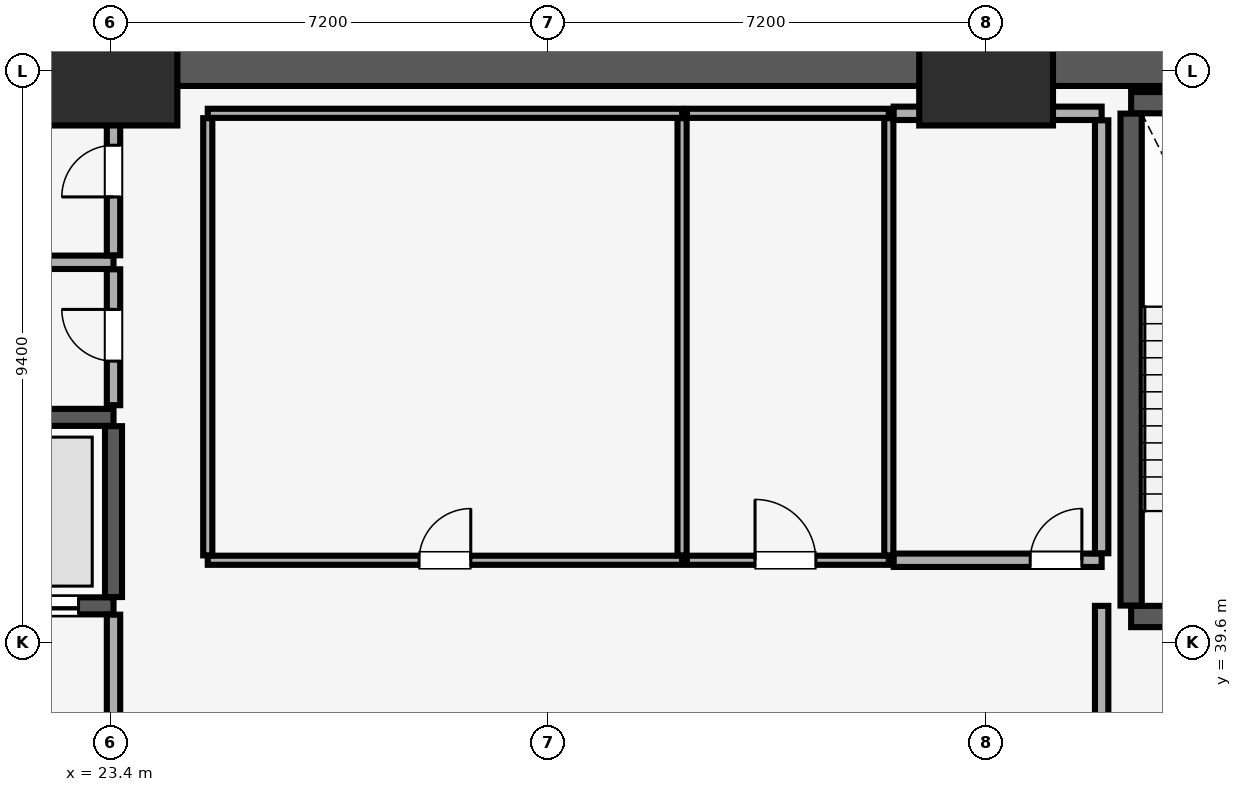
"""IFC4 building model, lengths in metres.
Left out: names, types, materials, properties, quantities, classifications, styles, units other than length and angle.
Written with IfcOpenShell. Run it as: python <this file> out.ifc"""

import sys

from ifc_helpers import new_model, si_unit, direction, frame, frame_2d, origin, origin_2d, place, context, subcontext, project, spatial, rectangle, extrude, element, fill, save


model = new_model("IFC4")
c1 = context("Model", 3, precision=1e-05, world=origin(), true_north=direction((0.0, 1.0)))
c2 = subcontext(c1, "Body", "Model", "MODEL_VIEW")
j1 = project(units=[si_unit("LENGTHUNIT", "METRE"), si_unit("PLANEANGLEUNIT", "RADIAN")], contexts=[c1])
p1 = place(None, origin())
s1 = spatial("IfcSite", under=j1, at=p1, CompositionType="ELEMENT")
p2 = place(p1, origin())
s2 = spatial("IfcBuilding", under=s1, at=p2, CompositionType="ELEMENT")
p3 = place(p2, frame((0.0, 0.0, -4.6)))
s3 = spatial("IfcBuildingStorey", under=s2, at=p3, CompositionType="ELEMENT", Elevation=-4.6)
for number, where, z_axis, x_axis in (
    (1, (23.4, 49.0, 0.0), (0.0, 0.0, 1.0), (1.0, 0.0, 0.0)),
    (2, (37.8, 49.0, 0.0), (0.0, 0.0, 1.0), (1.0, 0.0, 0.0)),
):
    element("IfcColumn", number, at=place(p3, frame(where, z_axis=z_axis, x_axis=x_axis)), inside=s3, PredefinedType="USERDEFINED", context=c2, shape_type="SweptSolid", body=[
        extrude(rectangle(XDim=2.2, YDim=1.8, at=origin_2d()), origin(), (0.0, 0.0, 1.0), 4.25),
    ])
p4 = place(p3, frame((16.2, 49.3, 0.0), z_axis=(0.0, 0.0, 1.0), x_axis=(1.0, 0.0, 0.0)))
e3 = element("IfcWall", 3, at=p4, inside=s3, PredefinedType="SHEAR", context=c2, shape_type="SweptSolid", body=[
    extrude(rectangle(XDim=51.6, YDim=1.1, at=frame_2d((25.8, 0.0))), origin(), (0.0, 0.0, 1.0), 4.25),
])
p5 = place(p3, frame((40.185, 40.025, 0.0), z_axis=(0.0, 0.0, 1.0), x_axis=(1.0, 0.0, 0.0)))
e4 = element("IfcWall", 4, at=p5, inside=s3, PredefinedType="SHEAR", context=c2, shape_type="SweptSolid", body=[
    extrude(rectangle(XDim=3.63, YDim=0.35, at=frame_2d((1.815, 0.0))), origin(), (0.0, 0.0, 1.0), 4.25),
])
p6 = place(p5, frame((1.24, 0.0, 0.0)))
e5 = element("IfcOpeningElement", 5, at=p6, cuts=e4, PredefinedType="OPENING", context=c2, shape_type="SweptSolid", body=[
    extrude(rectangle(XDim=1.15, YDim=2.15, at=frame_2d((0.575, 1.075))), frame((0.0, 0.185, 0.0), z_axis=(0.0, -1.0, 0.0), x_axis=(1.0, 0.0, 0.0)), (0.0, 0.0, 1.0), 0.37),
])
p7 = place(p3, frame((40.185, 48.475, 0.0), z_axis=(0.0, 0.0, 1.0), x_axis=(1.0, 0.0, 0.0)))
e6 = element("IfcWall", 6, at=p7, inside=s3, PredefinedType="SHEAR", context=c2, shape_type="SweptSolid", body=[
    extrude(rectangle(XDim=3.63, YDim=0.35, at=frame_2d((1.815, 0.0))), origin(), (0.0, 0.0, 1.0), 4.25),
])
p8 = place(p3, frame((40.185, 40.205, 0.0), z_axis=(0.0, 0.0, 1.0), x_axis=(0.0, 1.0, 0.0)))
e7 = element("IfcWall", 7, at=p8, inside=s3, PredefinedType="SHEAR", context=c2, shape_type="SweptSolid", body=[
    extrude(rectangle(XDim=8.09, YDim=0.35, at=frame_2d((4.045, 0.0))), origin(), (0.0, 0.0, 1.0), 4.25),
])
p9 = place(p3, frame((21.035, 40.2, 0.0), z_axis=(0.0, 0.0, 1.0), x_axis=(1.0, 0.0, 0.0)))
e8 = element("IfcWall", 8, at=p9, inside=s3, PredefinedType="SHEAR", context=c2, shape_type="SweptSolid", body=[
    extrude(rectangle(XDim=2.415, YDim=0.28, at=frame_2d((1.208, 0.0))), origin(), (0.0, 0.0, 1.0), 4.25),
])
p10 = place(p9, frame((0.54, 0.0, 0.0)))
e9 = element("IfcOpeningElement", 9, at=p10, cuts=e8, PredefinedType="OPENING", context=c2, shape_type="SweptSolid", body=[
    extrude(rectangle(XDim=1.3, YDim=2.3, at=frame_2d((0.65, 1.15))), frame((0.0, 0.15, 0.0), z_axis=(0.0, -1.0, 0.0), x_axis=(1.0, 0.0, 0.0)), (0.0, 0.0, 1.0), 0.3),
])
p11 = place(p3, frame((21.035, 43.3, 0.0), z_axis=(0.0, 0.0, 1.0), x_axis=(1.0, 0.0, 0.0)))
e10 = element("IfcWall", 10, at=p11, inside=s3, PredefinedType="SHEAR", context=c2, shape_type="SweptSolid", body=[
    extrude(rectangle(XDim=2.415, YDim=0.28, at=frame_2d((1.208, 0.0))), origin(), (0.0, 0.0, 1.0), 4.25),
])
p12 = place(p3, frame((23.45, 40.345, 0.0), z_axis=(0.0, 0.0, 1.0), x_axis=(0.0, 1.0, 0.0)))
e11 = element("IfcWall", 11, at=p12, inside=s3, PredefinedType="SHEAR", context=c2, shape_type="SweptSolid", body=[
    extrude(rectangle(XDim=2.81, YDim=0.28, at=frame_2d((1.405, 0.0))), origin(), (0.0, 0.0, 1.0), 4.25),
])
p13 = place(p3, frame((23.45, 34.415, 0.0), z_axis=(0.0, 0.0, 1.0), x_axis=(0.0, 1.0, 0.0)))
e12 = element("IfcWall", 12, at=p13, inside=s3, PredefinedType="PARTITIONING", context=c2, shape_type="SweptSolid", body=[
    extrude(rectangle(XDim=5.64, YDim=0.22, at=frame_2d((2.82, 0.0))), origin(), (0.0, 0.0, 1.0), 4.25),
])
p14 = place(p3, frame((39.7, 34.415, 0.0), z_axis=(0.0, 0.0, 1.0), x_axis=(0.0, 1.0, 0.0)))
e13 = element("IfcWall", 13, at=p14, inside=s3, PredefinedType="PARTITIONING", context=c2, shape_type="SweptSolid", body=[
    extrude(rectangle(XDim=5.785, YDim=0.22, at=frame_2d((2.893, 0.0))), origin(), (0.0, 0.0, 1.0), 4.25),
])
p15 = place(p3, frame((21.035, 45.85, 0.0), z_axis=(0.0, 0.0, 1.0), x_axis=(1.0, 0.0, 0.0)))
e14 = element("IfcWall", 14, at=p15, inside=s3, PredefinedType="PARTITIONING", context=c2, shape_type="SweptSolid", body=[
    extrude(rectangle(XDim=2.415, YDim=0.22, at=frame_2d((1.208, 0.0))), origin(), (0.0, 0.0, 1.0), 4.25),
])
p16 = place(p3, frame((23.45, 43.5, 0.0), z_axis=(0.0, 0.0, 1.0), x_axis=(0.0, 1.0, 0.0)))
e15 = element("IfcWall", 15, at=p16, inside=s3, PredefinedType="PARTITIONING", context=c2, shape_type="SweptSolid", body=[
    extrude(rectangle(XDim=2.235, YDim=0.22, at=frame_2d((1.118, 0.0))), origin(), (0.0, 0.0, 1.0), 4.25),
])
p17 = place(p16, frame((0.725, 0.0, 0.0)))
e16 = element("IfcOpeningElement", 16, at=p17, cuts=e15, PredefinedType="OPENING", context=c2, shape_type="SweptSolid", body=[
    extrude(rectangle(XDim=0.85, YDim=2.1, at=frame_2d((0.425, 1.05))), frame((0.0, 0.12, 0.0), z_axis=(0.0, -1.0, 0.0), x_axis=(1.0, 0.0, 0.0)), (0.0, 0.0, 1.0), 0.24),
])
p18 = place(p3, frame((21.035, 48.3, 0.0), z_axis=(0.0, 0.0, 1.0), x_axis=(1.0, 0.0, 0.0)))
e17 = element("IfcWall", 17, at=p18, inside=s3, PredefinedType="PARTITIONING", context=c2, shape_type="SweptSolid", body=[
    extrude(rectangle(XDim=2.415, YDim=0.22, at=frame_2d((1.208, 0.0))), origin(), (0.0, 0.0, 1.0), 4.25),
])
p19 = place(p3, frame((23.45, 45.965, 0.0), z_axis=(0.0, 0.0, 1.0), x_axis=(0.0, 1.0, 0.0)))
e18 = element("IfcWall", 18, at=p19, inside=s3, PredefinedType="PARTITIONING", context=c2, shape_type="SweptSolid", body=[
    extrude(rectangle(XDim=2.22, YDim=0.22, at=frame_2d((1.11, 0.0))), origin(), (0.0, 0.0, 1.0), 4.25),
])
p20 = place(p19, frame((0.96, 0.0, 0.0)))
e19 = element("IfcOpeningElement", 19, at=p20, cuts=e18, PredefinedType="OPENING", context=c2, shape_type="SweptSolid", body=[
    extrude(rectangle(XDim=0.85, YDim=2.1, at=frame_2d((0.425, 1.05))), frame((0.0, 0.12, 0.0), z_axis=(0.0, -1.0, 0.0), x_axis=(1.0, 0.0, 0.0)), (0.0, 0.0, 1.0), 0.24),
])
p21 = place(p3, frame((25.0, 40.95, 0.0), z_axis=(0.0, 0.0, 1.0), x_axis=(1.0, 0.0, 0.0)))
e20 = element("IfcWall", 20, at=p21, inside=s3, PredefinedType="PARTITIONING", context=c2, shape_type="SweptSolid", body=[
    extrude(rectangle(XDim=7.8, YDim=0.15, at=frame_2d((3.9, 0.0))), origin(), (0.0, 0.0, 1.0), 4.25),
])
p22 = place(p21, frame((3.475, 0.0, 0.0)))
e21 = element("IfcOpeningElement", 21, at=p22, cuts=e20, PredefinedType="OPENING", context=c2, shape_type="SweptSolid", body=[
    extrude(rectangle(XDim=0.85, YDim=2.1, at=frame_2d((0.425, 1.05))), frame((0.0, 0.085, 0.0), z_axis=(0.0, -1.0, 0.0), x_axis=(1.0, 0.0, 0.0)), (0.0, 0.0, 1.0), 0.17),
])
p23 = place(p3, frame((25.0, 48.3, 0.0), z_axis=(0.0, 0.0, 1.0), x_axis=(1.0, 0.0, 0.0)))
e22 = element("IfcWall", 22, at=p23, inside=s3, PredefinedType="PARTITIONING", context=c2, shape_type="SweptSolid", body=[
    extrude(rectangle(XDim=7.8, YDim=0.15, at=frame_2d((3.9, 0.0))), origin(), (0.0, 0.0, 1.0), 4.25),
])
for number, where, z_axis, x_axis in (
    (23, (25.0, 41.03, 0.0), (0.0, 0.0, 1.0), (0.0, 1.0, 0.0)),
    (24, (32.8, 41.03, 0.0), (0.0, 0.0, 1.0), (0.0, 1.0, 0.0)),
):
    element("IfcWall", number, at=place(p3, frame(where, z_axis=z_axis, x_axis=x_axis)), inside=s3, PredefinedType="PARTITIONING", context=c2, shape_type="SweptSolid", body=[
        extrude(rectangle(XDim=7.19, YDim=0.15, at=frame_2d((3.595, 0.0))), origin(), (0.0, 0.0, 1.0), 4.25),
    ])
p24 = place(p3, frame((32.88, 40.95, 0.0), z_axis=(0.0, 0.0, 1.0), x_axis=(1.0, 0.0, 0.0)))
e25 = element("IfcWall", 25, at=p24, inside=s3, PredefinedType="PARTITIONING", context=c2, shape_type="SweptSolid", body=[
    extrude(rectangle(XDim=3.32, YDim=0.15, at=frame_2d((1.66, 0.0))), origin(), (0.0, 0.0, 1.0), 4.25),
])
p25 = place(p24, frame((1.12, 0.0, 0.0)))
e26 = element("IfcOpeningElement", 26, at=p25, cuts=e25, PredefinedType="OPENING", context=c2, shape_type="SweptSolid", body=[
    extrude(rectangle(XDim=1.0, YDim=2.15, at=frame_2d((0.5, 1.075))), frame((0.0, 0.085, 0.0), z_axis=(0.0, -1.0, 0.0), x_axis=(1.0, 0.0, 0.0)), (0.0, 0.0, 1.0), 0.17),
])
p26 = place(p3, frame((32.88, 48.3, 0.0), z_axis=(0.0, 0.0, 1.0), x_axis=(1.0, 0.0, 0.0)))
e27 = element("IfcWall", 27, at=p26, inside=s3, PredefinedType="PARTITIONING", context=c2, shape_type="SweptSolid", body=[
    extrude(rectangle(XDim=3.32, YDim=0.15, at=frame_2d((1.66, 0.0))), origin(), (0.0, 0.0, 1.0), 4.25),
])
p27 = place(p3, frame((36.2, 41.03, 0.0), z_axis=(0.0, 0.0, 1.0), x_axis=(0.0, 1.0, 0.0)))
e28 = element("IfcWall", 28, at=p27, inside=s3, PredefinedType="PARTITIONING", context=c2, shape_type="SweptSolid", body=[
    extrude(rectangle(XDim=7.19, YDim=0.15, at=frame_2d((3.595, 0.0))), origin(), (0.0, 0.0, 1.0), 4.25),
])
p28 = place(p3, frame((36.28, 40.95, 0.0), z_axis=(0.0, 0.0, 1.0), x_axis=(1.0, 0.0, 0.0)))
e29 = element("IfcWall", 29, at=p28, inside=s3, PredefinedType="PARTITIONING", context=c2, shape_type="SweptSolid", body=[
    extrude(rectangle(XDim=3.42, YDim=0.22, at=frame_2d((1.71, 0.0))), origin(), (0.0, 0.0, 1.0), 4.25),
])
p29 = place(p28, frame((2.245, 0.0, 0.0)))
e30 = element("IfcOpeningElement", 30, at=p29, cuts=e29, PredefinedType="OPENING", context=c2, shape_type="SweptSolid", body=[
    extrude(rectangle(XDim=0.85, YDim=2.1, at=frame_2d((0.425, 1.05))), frame((0.0, 0.12, 0.0), z_axis=(0.0, -1.0, 0.0), x_axis=(1.0, 0.0, 0.0)), (0.0, 0.0, 1.0), 0.24),
])
p30 = place(p3, frame((36.28, 48.3, 0.0), z_axis=(0.0, 0.0, 1.0), x_axis=(1.0, 0.0, 0.0)))
e31 = element("IfcWall", 31, at=p30, inside=s3, PredefinedType="PARTITIONING", context=c2, shape_type="SweptSolid", body=[
    extrude(rectangle(XDim=3.42, YDim=0.22, at=frame_2d((1.71, 0.0))), origin(), (0.0, 0.0, 1.0), 4.25),
])
p31 = place(p3, frame((39.7, 41.065, 0.0), z_axis=(0.0, 0.0, 1.0), x_axis=(0.0, 1.0, 0.0)))
e32 = element("IfcWall", 32, at=p31, inside=s3, PredefinedType="PARTITIONING", context=c2, shape_type="SweptSolid", body=[
    extrude(rectangle(XDim=7.12, YDim=0.22, at=frame_2d((3.56, 0.0))), origin(), (0.0, 0.0, 1.0), 4.25),
])
p32 = place(p10, origin())
e33 = element("IfcDoor", 33, at=p32, inside=s3, OperationType="DOUBLE_DOOR_SLIDING", PredefinedType="DOOR", context=c2, shape_type="SweptSolid", body=[
    extrude(rectangle(XDim=1.3, YDim=2.3, at=frame_2d((0.65, 1.15))), frame((0.0, 0.025, 0.0), z_axis=(0.0, -1.0, 0.0), x_axis=(1.0, 0.0, 0.0)), (0.0, 0.0, 1.0), 0.05),
])
fill(e9, e33)
p33 = place(p17, origin())
e34 = element("IfcDoor", 34, at=p33, inside=s3, OperationType="SINGLE_SWING_RIGHT", PredefinedType="DOOR", context=c2, shape_type="SweptSolid", body=[
    extrude(rectangle(XDim=0.85, YDim=2.1, at=frame_2d((0.425, 1.05))), frame((0.0, 0.025, 0.0), z_axis=(0.0, -1.0, 0.0), x_axis=(1.0, 0.0, 0.0)), (0.0, 0.0, 1.0), 0.05),
])
fill(e16, e34)
p34 = place(p20, origin())
e35 = element("IfcDoor", 35, at=p34, inside=s3, OperationType="SINGLE_SWING_LEFT", PredefinedType="DOOR", context=c2, shape_type="SweptSolid", body=[
    extrude(rectangle(XDim=0.85, YDim=2.1, at=frame_2d((0.425, 1.05))), frame((0.0, 0.025, 0.0), z_axis=(0.0, -1.0, 0.0), x_axis=(1.0, 0.0, 0.0)), (0.0, 0.0, 1.0), 0.05),
])
fill(e19, e35)
p35 = place(p22, origin())
e36 = element("IfcDoor", 36, at=p35, inside=s3, OperationType="SINGLE_SWING_RIGHT", PredefinedType="DOOR", context=c2, shape_type="SweptSolid", body=[
    extrude(rectangle(XDim=0.85, YDim=2.1, at=frame_2d((0.425, 1.05))), frame((0.0, 0.025, 0.0), z_axis=(0.0, -1.0, 0.0), x_axis=(1.0, 0.0, 0.0)), (0.0, 0.0, 1.0), 0.05),
])
fill(e21, e36)
p36 = place(p25, origin())
e37 = element("IfcDoor", 37, at=p36, inside=s3, OperationType="SINGLE_SWING_LEFT", PredefinedType="DOOR", context=c2, shape_type="SweptSolid", body=[
    extrude(rectangle(XDim=1.0, YDim=2.15, at=frame_2d((0.5, 1.075))), frame((0.0, 0.025, 0.0), z_axis=(0.0, -1.0, 0.0), x_axis=(1.0, 0.0, 0.0)), (0.0, 0.0, 1.0), 0.05),
])
fill(e26, e37)
p37 = place(p29, origin())
e38 = element("IfcDoor", 38, at=p37, inside=s3, OperationType="SINGLE_SWING_RIGHT", PredefinedType="DOOR", context=c2, shape_type="SweptSolid", body=[
    extrude(rectangle(XDim=0.85, YDim=2.1, at=frame_2d((0.425, 1.05))), frame((0.0, 0.025, 0.0), z_axis=(0.0, -1.0, 0.0), x_axis=(1.0, 0.0, 0.0)), (0.0, 0.0, 1.0), 0.05),
])
fill(e30, e38)
save(model, sys.argv[1])
